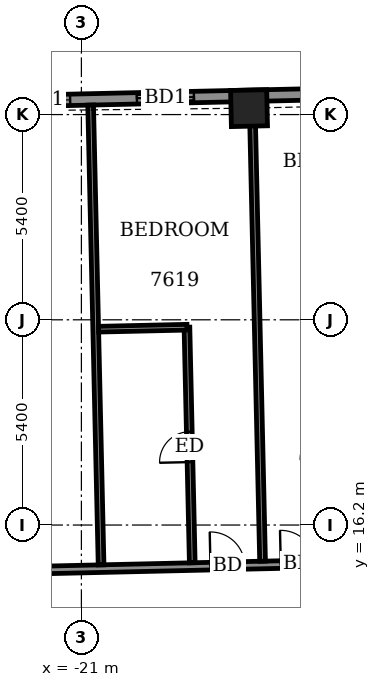
"""IFC4 building model, lengths in metres.
Left out: names, types, materials, properties, quantities, classifications, styles, units other than length and angle.
Written with IfcOpenShell. Run it as: python <this file> out.ifc"""

import sys

from ifc_helpers import new_model, si_unit, direction, frame, frame_2d, origin, origin_2d, place, context, subcontext, project, spatial, rectangle, extrude, element, fill, save


model = new_model("IFC4")
c1 = context("Model", 3, precision=1e-05, world=origin(), true_north=direction((0.0, 1.0)))
c2 = subcontext(c1, "Body", "Model", "MODEL_VIEW")
j1 = project(units=[si_unit("LENGTHUNIT", "METRE"), si_unit("PLANEANGLEUNIT", "RADIAN")], contexts=[c1])
p1 = place(None, origin())
s1 = spatial("IfcSite", under=j1, at=p1, CompositionType="ELEMENT")
p2 = place(p1, origin())
s2 = spatial("IfcBuilding", under=s1, at=p2, CompositionType="ELEMENT")
p3 = place(p2, frame((0.0, 0.0, 297.9)))
s3 = spatial("IfcBuildingStorey", under=s2, at=p3, CompositionType="ELEMENT", Elevation=297.9)
p4 = place(p3, frame((-16.589, 27.169, -0.55), z_axis=(0.0, 0.0, 1.0), x_axis=(-0.9997425919, -0.02268810132, 0.0)))
e1 = element("IfcColumn", 1, at=p4, inside=s3, PredefinedType="COLUMN", context=c2, shape_type="SweptSolid", body=[
    extrude(rectangle(XDim=0.95, YDim=0.95, at=origin_2d()), origin(), (0.0, 0.0, 1.0), 3.6),
])
p5 = place(p3, frame((26.216, 28.465, 0.0), z_axis=(0.0, 0.0, 1.0), x_axis=(-0.999742843677, -0.022677004157, 0.0)))
e2 = element("IfcWall", 2, at=p5, inside=s3, PredefinedType="SOLIDWALL", context=c2, shape_type="SweptSolid", body=[
    extrude(rectangle(XDim=49.836, YDim=0.3, at=frame_2d((24.918, 0.0))), origin(), (0.0, 0.0, 1.0), 2.5),
])
p6 = place(p5, frame((1.763, 0.0, 0.0)))
e3 = element("IfcOpeningElement", 3, at=p6, cuts=e2, PredefinedType="OPENING", context=c2, shape_type="SweptSolid", body=[
    extrude(rectangle(XDim=1.5, YDim=2.4, at=frame_2d((0.75, 1.2))), frame((0.0, 0.16, 0.0), z_axis=(0.0, -1.0, 0.0), x_axis=(1.0, 0.0, 0.0)), (0.0, 0.0, 1.0), 0.32),
])
p7 = place(p5, frame((4.912, 0.0, 0.0)))
e4 = element("IfcOpeningElement", 4, at=p7, cuts=e2, PredefinedType="OPENING", context=c2, shape_type="SweptSolid", body=[
    extrude(rectangle(XDim=1.5, YDim=2.4, at=frame_2d((0.75, 1.2))), frame((0.0, 0.16, 0.0), z_axis=(0.0, -1.0, 0.0), x_axis=(1.0, 0.0, 0.0)), (0.0, 0.0, 1.0), 0.32),
])
p8 = place(p5, frame((10.186, 0.0, 0.0)))
e5 = element("IfcOpeningElement", 5, at=p8, cuts=e2, PredefinedType="OPENING", context=c2, shape_type="SweptSolid", body=[
    extrude(rectangle(XDim=1.5, YDim=2.4, at=frame_2d((0.75, 1.2))), frame((0.0, 0.16, 0.0), z_axis=(0.0, -1.0, 0.0), x_axis=(1.0, 0.0, 0.0)), (0.0, 0.0, 1.0), 0.32),
])
p9 = place(p5, frame((15.093, 0.0, 0.0)))
e6 = element("IfcOpeningElement", 6, at=p9, cuts=e2, PredefinedType="OPENING", context=c2, shape_type="SweptSolid", body=[
    extrude(rectangle(XDim=1.5, YDim=2.4, at=frame_2d((0.75, 1.2))), frame((0.0, 0.16, 0.0), z_axis=(0.0, -1.0, 0.0), x_axis=(1.0, 0.0, 0.0)), (0.0, 0.0, 1.0), 0.32),
])
p10 = place(p5, frame((18.449, 0.0, 0.0)))
e7 = element("IfcOpeningElement", 7, at=p10, cuts=e2, PredefinedType="OPENING", context=c2, shape_type="SweptSolid", body=[
    extrude(rectangle(XDim=1.5, YDim=2.4, at=frame_2d((0.75, 1.2))), frame((0.0, 0.16, 0.0), z_axis=(0.0, -1.0, 0.0), x_axis=(1.0, 0.0, 0.0)), (0.0, 0.0, 1.0), 0.32),
])
p11 = place(p5, frame((22.924, 0.0, 0.0)))
e8 = element("IfcOpeningElement", 8, at=p11, cuts=e2, PredefinedType="OPENING", context=c2, shape_type="SweptSolid", body=[
    extrude(rectangle(XDim=1.5, YDim=2.4, at=frame_2d((0.75, 1.2))), frame((0.0, 0.16, 0.0), z_axis=(0.0, -1.0, 0.0), x_axis=(1.0, 0.0, 0.0)), (0.0, 0.0, 1.0), 0.32),
])
p12 = place(p5, frame((26.28, 0.0, 0.0)))
e9 = element("IfcOpeningElement", 9, at=p12, cuts=e2, PredefinedType="OPENING", context=c2, shape_type="SweptSolid", body=[
    extrude(rectangle(XDim=1.5, YDim=2.4, at=frame_2d((0.75, 1.2))), frame((0.0, 0.16, 0.0), z_axis=(0.0, -1.0, 0.0), x_axis=(1.0, 0.0, 0.0)), (0.0, 0.0, 1.0), 0.32),
])
p13 = place(p5, frame((31.361, 0.0, 0.0)))
e10 = element("IfcOpeningElement", 10, at=p13, cuts=e2, PredefinedType="OPENING", context=c2, shape_type="SweptSolid", body=[
    extrude(rectangle(XDim=1.5, YDim=2.4, at=frame_2d((0.75, 1.2))), frame((0.0, 0.16, 0.0), z_axis=(0.0, -1.0, 0.0), x_axis=(1.0, 0.0, 0.0)), (0.0, 0.0, 1.0), 0.32),
])
p14 = place(p5, frame((36.437, 0.0, 0.0)))
e11 = element("IfcOpeningElement", 11, at=p14, cuts=e2, PredefinedType="OPENING", context=c2, shape_type="SweptSolid", body=[
    extrude(rectangle(XDim=1.5, YDim=2.4, at=frame_2d((0.75, 1.2))), frame((0.0, 0.16, 0.0), z_axis=(0.0, -1.0, 0.0), x_axis=(1.0, 0.0, 0.0)), (0.0, 0.0, 1.0), 0.32),
])
p15 = place(p5, frame((39.793, 0.0, 0.0)))
e12 = element("IfcOpeningElement", 12, at=p15, cuts=e2, PredefinedType="OPENING", context=c2, shape_type="SweptSolid", body=[
    extrude(rectangle(XDim=1.5, YDim=2.4, at=frame_2d((0.75, 1.2))), frame((0.0, 0.16, 0.0), z_axis=(0.0, -1.0, 0.0), x_axis=(1.0, 0.0, 0.0)), (0.0, 0.0, 1.0), 0.32),
])
p16 = place(p5, frame((44.267, 0.0, 0.0)))
e13 = element("IfcOpeningElement", 13, at=p16, cuts=e2, PredefinedType="OPENING", context=c2, shape_type="SweptSolid", body=[
    extrude(rectangle(XDim=1.5, YDim=2.4, at=frame_2d((0.75, 1.2))), frame((0.0, 0.16, 0.0), z_axis=(0.0, -1.0, 0.0), x_axis=(1.0, 0.0, 0.0)), (0.0, 0.0, 1.0), 0.32),
])
p17 = place(p5, frame((47.524, 0.0, 0.9)))
e14 = element("IfcOpeningElement", 14, at=p17, cuts=e2, PredefinedType="OPENING", context=c2, shape_type="SweptSolid", body=[
    extrude(rectangle(XDim=1.2, YDim=1.5, at=frame_2d((0.6, 0.75))), frame((0.0, 0.16, 0.0), z_axis=(0.0, -1.0, 0.0), x_axis=(1.0, 0.0, 0.0)), (0.0, 0.0, 1.0), 0.32),
])
p18 = place(p3, frame((-26.401, 14.918, 0.0), z_axis=(0.0, 0.0, 1.0), x_axis=(0.99974239733, 0.022696673341, 0.0)))
e15 = element("IfcWall", 15, at=p18, inside=s3, PredefinedType="PARTITIONING", context=c2, shape_type="SweptSolid", body=[
    extrude(rectangle(XDim=55.386, YDim=0.2, at=frame_2d((27.693, 0.0))), origin(), (0.0, 0.0, 1.0), 3.05),
])
p19 = place(p18, frame((53.718, 0.0, 0.0)))
e16 = element("IfcOpeningElement", 16, at=p19, cuts=e15, PredefinedType="OPENING", context=c2, shape_type="SweptSolid", body=[
    extrude(rectangle(XDim=1.0, YDim=2.1, at=frame_2d((0.5, 1.05))), frame((0.0, 0.11, 0.0), z_axis=(0.0, -1.0, 0.0), x_axis=(1.0, 0.0, 0.0)), (0.0, 0.0, 1.0), 0.22),
])
p20 = place(p18, frame((49.325, 0.0, 0.0)))
e17 = element("IfcOpeningElement", 17, at=p20, cuts=e15, PredefinedType="OPENING", context=c2, shape_type="SweptSolid", body=[
    extrude(rectangle(XDim=0.9, YDim=2.1, at=frame_2d((0.45, 1.05))), frame((0.0, 0.11, 0.0), z_axis=(0.0, -1.0, 0.0), x_axis=(1.0, 0.0, 0.0)), (0.0, 0.0, 1.0), 0.22),
])
p21 = place(p18, frame((44.575, 0.0, 0.0)))
e18 = element("IfcOpeningElement", 18, at=p21, cuts=e15, PredefinedType="OPENING", context=c2, shape_type="SweptSolid", body=[
    extrude(rectangle(XDim=0.9, YDim=2.1, at=frame_2d((0.45, 1.05))), frame((0.0, 0.11, 0.0), z_axis=(0.0, -1.0, 0.0), x_axis=(1.0, 0.0, 0.0)), (0.0, 0.0, 1.0), 0.22),
])
p22 = place(p18, frame((42.725, 0.0, 0.0)))
e19 = element("IfcOpeningElement", 19, at=p22, cuts=e15, PredefinedType="OPENING", context=c2, shape_type="SweptSolid", body=[
    extrude(rectangle(XDim=0.9, YDim=2.1, at=frame_2d((0.45, 1.05))), frame((0.0, 0.11, 0.0), z_axis=(0.0, -1.0, 0.0), x_axis=(1.0, 0.0, 0.0)), (0.0, 0.0, 1.0), 0.22),
])
p23 = place(p18, frame((36.1, 0.0, 0.0)))
e20 = element("IfcOpeningElement", 20, at=p23, cuts=e15, PredefinedType="OPENING", context=c2, shape_type="SweptSolid", body=[
    extrude(rectangle(XDim=0.9, YDim=2.1, at=frame_2d((0.45, 1.05))), frame((0.0, 0.11, 0.0), z_axis=(0.0, -1.0, 0.0), x_axis=(1.0, 0.0, 0.0)), (0.0, 0.0, 1.0), 0.22),
])
p24 = place(p18, frame((34.25, 0.0, 0.0)))
e21 = element("IfcOpeningElement", 21, at=p24, cuts=e15, PredefinedType="OPENING", context=c2, shape_type="SweptSolid", body=[
    extrude(rectangle(XDim=0.9, YDim=2.1, at=frame_2d((0.45, 1.05))), frame((0.0, 0.11, 0.0), z_axis=(0.0, -1.0, 0.0), x_axis=(1.0, 0.0, 0.0)), (0.0, 0.0, 1.0), 0.22),
])
p25 = place(p18, frame((27.6, 0.0, 0.0)))
e22 = element("IfcOpeningElement", 22, at=p25, cuts=e15, PredefinedType="OPENING", context=c2, shape_type="SweptSolid", body=[
    extrude(rectangle(XDim=0.9, YDim=2.1, at=frame_2d((0.45, 1.05))), frame((0.0, 0.11, 0.0), z_axis=(0.0, -1.0, 0.0), x_axis=(1.0, 0.0, 0.0)), (0.0, 0.0, 1.0), 0.22),
])
p26 = place(p18, frame((25.775, 0.0, 0.0)))
e23 = element("IfcOpeningElement", 23, at=p26, cuts=e15, PredefinedType="OPENING", context=c2, shape_type="SweptSolid", body=[
    extrude(rectangle(XDim=0.9, YDim=2.1, at=frame_2d((0.45, 1.05))), frame((0.0, 0.11, 0.0), z_axis=(0.0, -1.0, 0.0), x_axis=(1.0, 0.0, 0.0)), (0.0, 0.0, 1.0), 0.22),
])
p27 = place(p18, frame((19.15, 0.0, 0.0)))
e24 = element("IfcOpeningElement", 24, at=p27, cuts=e15, PredefinedType="OPENING", context=c2, shape_type="SweptSolid", body=[
    extrude(rectangle(XDim=0.9, YDim=2.1, at=frame_2d((0.45, 1.05))), frame((0.0, 0.11, 0.0), z_axis=(0.0, -1.0, 0.0), x_axis=(1.0, 0.0, 0.0)), (0.0, 0.0, 1.0), 0.22),
])
p28 = place(p18, frame((17.3, 0.0, 0.0)))
e25 = element("IfcOpeningElement", 25, at=p28, cuts=e15, PredefinedType="OPENING", context=c2, shape_type="SweptSolid", body=[
    extrude(rectangle(XDim=0.9, YDim=2.1, at=frame_2d((0.45, 1.05))), frame((0.0, 0.11, 0.0), z_axis=(0.0, -1.0, 0.0), x_axis=(1.0, 0.0, 0.0)), (0.0, 0.0, 1.0), 0.22),
])
p29 = place(p18, frame((10.65, 0.0, 0.0)))
e26 = element("IfcOpeningElement", 26, at=p29, cuts=e15, PredefinedType="OPENING", context=c2, shape_type="SweptSolid", body=[
    extrude(rectangle(XDim=0.9, YDim=2.1, at=frame_2d((0.45, 1.05))), frame((0.0, 0.11, 0.0), z_axis=(0.0, -1.0, 0.0), x_axis=(1.0, 0.0, 0.0)), (0.0, 0.0, 1.0), 0.22),
])
p30 = place(p18, frame((8.8, 0.0, 0.0)))
e27 = element("IfcOpeningElement", 27, at=p30, cuts=e15, PredefinedType="OPENING", context=c2, shape_type="SweptSolid", body=[
    extrude(rectangle(XDim=0.9, YDim=2.1, at=frame_2d((0.45, 1.05))), frame((0.0, 0.11, 0.0), z_axis=(0.0, -1.0, 0.0), x_axis=(1.0, 0.0, 0.0)), (0.0, 0.0, 1.0), 0.22),
])
p31 = place(p18, frame((1.864, 0.0, 0.0)))
e28 = element("IfcOpeningElement", 28, at=p31, cuts=e15, PredefinedType="OPENING", context=c2, shape_type="SweptSolid", body=[
    extrude(rectangle(XDim=1.0, YDim=2.1, at=frame_2d((0.5, 1.05))), frame((0.0, 0.11, 0.0), z_axis=(0.0, -1.0, 0.0), x_axis=(1.0, 0.0, 0.0)), (0.0, 0.0, 1.0), 0.22),
])
p32 = place(p3, frame((-20.482, 15.152, 0.0), z_axis=(0.0, 0.0, 1.0), x_axis=(-0.022737445516, 0.999741470867, 0.0)))
e29 = element("IfcWall", 29, at=p32, inside=s3, PredefinedType="PARTITIONING", context=c2, shape_type="SweptSolid", body=[
    extrude(rectangle(XDim=12.101, YDim=0.15, at=frame_2d((6.051, 0.0))), origin(), (0.0, 0.0, 1.0), 2.55),
])
p33 = place(p3, frame((-18.083, 15.207, 0.0), z_axis=(0.0, 0.0, 1.0), x_axis=(-0.022564860101, 0.999745381129, 0.0)))
e30 = element("IfcWall", 30, at=p33, inside=s3, PredefinedType="PARTITIONING", context=c2, shape_type="SweptSolid", body=[
    extrude(rectangle(XDim=6.199, YDim=0.15, at=frame_2d((3.1, 0.0))), origin(), (0.0, 0.0, 1.0), 3.05),
])
p34 = place(p33, frame((2.65, 0.0, 0.0)))
e31 = element("IfcOpeningElement", 31, at=p34, cuts=e30, PredefinedType="OPENING", context=c2, shape_type="SweptSolid", body=[
    extrude(rectangle(XDim=0.8, YDim=2.1, at=frame_2d((0.4, 1.05))), frame((0.0, 0.085, 0.0), z_axis=(0.0, -1.0, 0.0), x_axis=(1.0, 0.0, 0.0)), (0.0, 0.0, 1.0), 0.17),
])
p35 = place(p3, frame((-16.233, 15.249, 0.0), z_axis=(0.0, 0.0, 1.0), x_axis=(-0.02273928012, 0.99974142914, 0.0)))
e32 = element("IfcWall", 32, at=p35, inside=s3, PredefinedType="PARTITIONING", context=c2, shape_type="SweptSolid", body=[
    extrude(rectangle(XDim=12.1, YDim=0.15, at=frame_2d((6.05, 0.0))), origin(), (0.0, 0.0, 1.0), 3.05),
])
p36 = place(p3, frame((-20.546, 21.353, 0.0), z_axis=(0.0, 0.0, 1.0), x_axis=(0.999749954681, 0.022361308448, 0.0)))
e33 = element("IfcWall", 33, at=p36, inside=s3, PredefinedType="PARTITIONING", context=c2, shape_type="SweptSolid", body=[
    extrude(rectangle(XDim=2.325, YDim=0.15, at=frame_2d((1.163, 0.0))), origin(), (0.0, 0.0, 1.0), 3.05),
])
p37 = place(p16, origin())
e34 = element("IfcDoor", 34, at=p37, inside=s3, OperationType="SLIDING_TO_LEFT", PredefinedType="DOOR", context=c2, shape_type="SweptSolid", body=[
    extrude(rectangle(XDim=1.5, YDim=2.4, at=frame_2d((0.75, 1.2))), frame((0.0, 0.025, 0.0), z_axis=(0.0, -1.0, 0.0), x_axis=(1.0, 0.0, 0.0)), (0.0, 0.0, 1.0), 0.05),
])
fill(e13, e34)
p38 = place(p17, origin())
e35 = element("IfcWindow", 35, at=p38, inside=s3, PartitioningType="SINGLE_PANEL", PredefinedType="WINDOW", context=c2, shape_type="SweptSolid", body=[
    extrude(rectangle(XDim=1.2, YDim=1.5, at=frame_2d((0.6, 0.75))), frame((0.0, 0.03, 0.0), z_axis=(0.0, -1.0, 0.0), x_axis=(1.0, 0.0, 0.0)), (0.0, 0.0, 1.0), 0.06),
])
fill(e14, e35)
p39 = place(p29, origin())
e36 = element("IfcDoor", 36, at=p39, inside=s3, OperationType="SINGLE_SWING_RIGHT", PredefinedType="DOOR", context=c2, shape_type="SweptSolid", body=[
    extrude(rectangle(XDim=0.9, YDim=2.1, at=frame_2d((0.45, 1.05))), frame((0.0, 0.025, 0.0), z_axis=(0.0, -1.0, 0.0), x_axis=(1.0, 0.0, 0.0)), (0.0, 0.0, 1.0), 0.05),
])
fill(e26, e36)
p40 = place(p30, origin())
e37 = element("IfcDoor", 37, at=p40, inside=s3, OperationType="SINGLE_SWING_LEFT", PredefinedType="DOOR", context=c2, shape_type="SweptSolid", body=[
    extrude(rectangle(XDim=0.9, YDim=2.1, at=frame_2d((0.45, 1.05))), frame((0.0, 0.025, 0.0), z_axis=(0.0, -1.0, 0.0), x_axis=(1.0, 0.0, 0.0)), (0.0, 0.0, 1.0), 0.05),
])
fill(e27, e37)
p41 = place(p34, origin())
e38 = element("IfcDoor", 38, at=p41, inside=s3, OperationType="SINGLE_SWING_LEFT", PredefinedType="DOOR", context=c2, shape_type="SweptSolid", body=[
    extrude(rectangle(XDim=0.8, YDim=2.1, at=frame_2d((0.4, 1.05))), frame((0.0, 0.025, 0.0), z_axis=(0.0, -1.0, 0.0), x_axis=(1.0, 0.0, 0.0)), (0.0, 0.0, 1.0), 0.05),
])
fill(e31, e38)
save(model, sys.argv[1])
